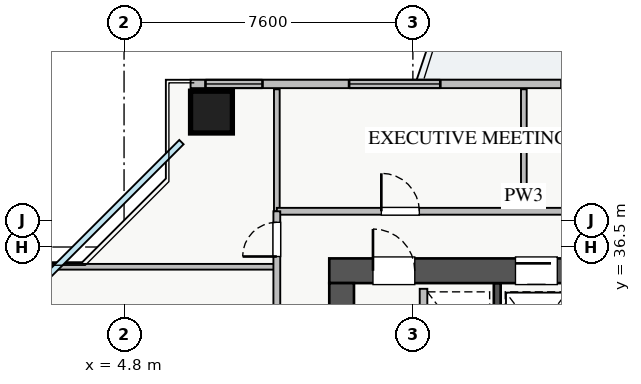
"""IFC4 building model, lengths in metres.
Left out: names, types, materials, properties, quantities, classifications, styles, units other than length and angle.
Written with IfcOpenShell. Run it as: python <this file> out.ifc"""

import sys

from ifc_helpers import new_model, si_unit, direction, frame, frame_2d, origin, origin_2d, place, context, subcontext, project, spatial, rectangle, extrude, source, transform, mapped, element, fill, save


model = new_model("IFC4")
c1 = context("Model", 3, precision=1e-05, world=origin(), true_north=direction((0.0, 1.0)))
c2 = subcontext(c1, "Body", "Model", "MODEL_VIEW")
j1 = project(units=[si_unit("LENGTHUNIT", "METRE"), si_unit("PLANEANGLEUNIT", "RADIAN")], contexts=[c1])
p1 = place(None, origin())
s1 = spatial("IfcSite", under=j1, at=p1, CompositionType="ELEMENT")
p2 = place(p1, origin())
s2 = spatial("IfcBuilding", under=s1, at=p2, CompositionType="ELEMENT")
p3 = place(p2, frame((0.0, 0.0, 100.25)))
s3 = spatial("IfcBuildingStorey", under=s2, at=p3, CompositionType="ELEMENT", Elevation=100.25)
p4 = place(p3, frame((14.62, 33.2, 0.0), z_axis=(0.0, 0.0, 1.0), x_axis=(0.0, 1.0, 0.0)))
e1 = element("IfcWall", 1, at=p4, inside=s3, PredefinedType="SHEAR", context=c2, shape_type="SweptSolid", body=[
    extrude(rectangle(XDim=2.35, YDim=0.18, at=frame_2d((1.175, 0.0))), origin(), (0.0, 0.0, 1.0), 3.07),
])
p5 = place(p3, frame((10.2, 35.875, 0.0), z_axis=(0.0, 0.0, 1.0), x_axis=(1.0, 0.0, 0.0)))
e2 = element("IfcWall", 2, at=p5, inside=s3, PredefinedType="SHEAR", context=c2, shape_type="SweptSolid", body=[
    extrude(rectangle(XDim=17.6, YDim=0.65, at=frame_2d((8.8, 0.0))), origin(), (0.0, 0.0, 1.0), 3.25),
])
p6 = place(p5, frame((1.15, 0.0, 0.0)))
e3 = element("IfcOpeningElement", 3, at=p6, cuts=e2, PredefinedType="OPENING", context=c2, shape_type="SweptSolid", body=[
    extrude(rectangle(XDim=1.1, YDim=2.05, at=frame_2d((0.55, 1.025))), frame((0.0, 0.335, 0.0), z_axis=(0.0, -1.0, 0.0), x_axis=(1.0, 0.0, 0.0)), (0.0, 0.0, 1.0), 0.67),
])
p7 = place(p5, frame((8.3, 0.0, 0.0)))
e4 = element("IfcOpeningElement", 4, at=p7, cuts=e2, PredefinedType="OPENING", context=c2, shape_type="SweptSolid", body=[
    extrude(rectangle(XDim=1.1, YDim=2.05, at=frame_2d((0.55, 1.025))), frame((0.0, 0.335, 0.0), z_axis=(0.0, -1.0, 0.0), x_axis=(1.0, 0.0, 0.0)), (0.0, 0.0, 1.0), 0.67),
])
p8 = place(p5, frame((4.9, 0.0, 0.0)))
e5 = element("IfcOpeningElement", 5, at=p8, cuts=e2, PredefinedType="OPENING", context=c2, shape_type="SweptSolid", body=[
    extrude(rectangle(XDim=1.1, YDim=2.05, at=frame_2d((0.55, 1.025))), frame((0.0, 0.335, 0.0), z_axis=(0.0, -1.0, 0.0), x_axis=(1.0, 0.0, 0.0)), (0.0, 0.0, 1.0), 0.67),
])
p9 = place(p5, frame((14.74, 0.0, 0.0)))
e6 = element("IfcOpeningElement", 6, at=p9, cuts=e2, PredefinedType="OPENING", context=c2, shape_type="SweptSolid", body=[
    extrude(rectangle(XDim=1.0, YDim=2.05, at=frame_2d((0.5, 1.025))), frame((0.0, 0.335, 0.0), z_axis=(0.0, -1.0, 0.0), x_axis=(1.0, 0.0, 0.0)), (0.0, 0.0, 1.0), 0.67),
])
p10 = place(p5, frame((10.25, 0.0, 0.0)))
e7 = element("IfcOpeningElement", 7, at=p10, cuts=e2, PredefinedType="OPENING", context=c2, shape_type="SweptSolid", body=[
    extrude(rectangle(XDim=1.0, YDim=2.05, at=frame_2d((0.5, 1.025))), frame((0.0, 0.335, 0.0), z_axis=(0.0, -1.0, 0.0), x_axis=(1.0, 0.0, 0.0)), (0.0, 0.0, 1.0), 0.67),
])
p11 = place(p5, frame((12.7, 0.0, 0.0)))
e8 = element("IfcOpeningElement", 8, at=p11, cuts=e2, PredefinedType="OPENING", context=c2, shape_type="SweptSolid", body=[
    extrude(rectangle(XDim=1.0, YDim=2.05, at=frame_2d((0.5, 1.025))), frame((0.0, 0.335, 0.0), z_axis=(0.0, -1.0, 0.0), x_axis=(1.0, 0.0, 0.0)), (0.0, 0.0, 1.0), 0.67),
])
p12 = place(p3, frame((10.525, 29.65, 0.0), z_axis=(0.0, 0.0, 1.0), x_axis=(0.0, 1.0, 0.0)))
e9 = element("IfcWall", 9, at=p12, inside=s3, PredefinedType="SHEAR", context=c2, shape_type="SweptSolid", body=[
    extrude(rectangle(XDim=5.9, YDim=0.65, at=frame_2d((2.95, 0.0))), origin(), (0.0, 0.0, 1.0), 3.25),
])
m1 = source(origin(), c2, "Body", "SweptSolid", [
    extrude(rectangle(XDim=1.1, YDim=1.1, at=origin_2d()), origin(), (0.0, 0.0, 1.0), 3.25),
])
p13 = place(p3, frame((7.1, 40.05, 0.0), z_axis=(0.0, 0.0, 1.0), x_axis=(1.0, 0.0, 0.0)))
e10 = element("IfcColumn", 10, at=p13, inside=s3, PredefinedType="COLUMN", context=c2, shape_type="MappedRepresentation", body=[
    mapped(m1, transform((0.0, 0.0, 0.0), x_axis=(1.0, 0.0, 0.0), y_axis=(0.0, 1.0, 0.0), z_axis=(0.0, 0.0, 1.0), scale=1.0)),
])
p14 = place(p3, frame((6.55, 40.79, 0.0), z_axis=(0.0, 0.0, 1.0), x_axis=(1.0, 0.0, 0.0)))
e11 = element("IfcWall", 11, at=p14, inside=s3, PredefinedType="STANDARD", context=c2, shape_type="SweptSolid", body=[
    extrude(rectangle(XDim=24.9, YDim=0.22, at=frame_2d((12.45, 0.0))), origin(), (0.0, 0.0, 1.0), 2.61),
])
p15 = place(p14, frame((13.3, 0.0, 0.0)))
e12 = element("IfcOpeningElement", 12, at=p15, cuts=e11, PredefinedType="OPENING", context=c2, shape_type="SweptSolid", body=[
    extrude(rectangle(XDim=1.2, YDim=2.1, at=frame_2d((0.6, 1.05))), frame((0.0, 0.12, 0.0), z_axis=(0.0, -1.0, 0.0), x_axis=(1.0, 0.0, 0.0)), (0.0, 0.0, 1.0), 0.24),
])
p16 = place(p14, frame((0.393, 0.0, 0.9)))
e13 = element("IfcOpeningElement", 13, at=p16, cuts=e11, PredefinedType="OPENING", context=c2, shape_type="SweptSolid", body=[
    extrude(rectangle(XDim=1.5, YDim=1.5, at=frame_2d((0.75, 0.75))), frame((0.0, 0.12, 0.0), z_axis=(0.0, -1.0, 0.0), x_axis=(1.0, 0.0, 0.0)), (0.0, 0.0, 1.0), 0.24),
])
p17 = place(p14, frame((9.76, 0.0, 0.9)))
e14 = element("IfcOpeningElement", 14, at=p17, cuts=e11, PredefinedType="OPENING", context=c2, shape_type="SweptSolid", body=[
    extrude(rectangle(XDim=1.8, YDim=1.5, at=frame_2d((0.9, 0.75))), frame((0.0, 0.12, 0.0), z_axis=(0.0, -1.0, 0.0), x_axis=(1.0, 0.0, 0.0)), (0.0, 0.0, 1.0), 0.24),
])
p18 = place(p14, frame((14.813, 0.0, 0.9)))
e15 = element("IfcOpeningElement", 15, at=p18, cuts=e11, PredefinedType="OPENING", context=c2, shape_type="SweptSolid", body=[
    extrude(rectangle(XDim=1.5, YDim=1.45, at=frame_2d((0.75, 0.725))), frame((0.0, 0.12, 0.0), z_axis=(0.0, -1.0, 0.0), x_axis=(1.0, 0.0, 0.0)), (0.0, 0.0, 1.0), 0.24),
])
p19 = place(p14, frame((20.738, 0.0, 0.9)))
e16 = element("IfcOpeningElement", 16, at=p19, cuts=e11, PredefinedType="OPENING", context=c2, shape_type="SweptSolid", body=[
    extrude(rectangle(XDim=2.1, YDim=1.48, at=frame_2d((1.05, 0.74))), frame((0.0, 0.12, 0.0), z_axis=(0.0, -1.0, 0.0), x_axis=(1.0, 0.0, 0.0)), (0.0, 0.0, 1.0), 0.24),
])
p20 = place(p14, frame((4.171, 0.0, 0.9)))
e17 = element("IfcOpeningElement", 17, at=p20, cuts=e11, PredefinedType="OPENING", context=c2, shape_type="SweptSolid", body=[
    extrude(rectangle(XDim=2.4, YDim=1.5, at=frame_2d((1.2, 0.75))), frame((0.0, 0.12, 0.0), z_axis=(0.0, -1.0, 0.0), x_axis=(1.0, 0.0, 0.0)), (0.0, 0.0, 1.0), 0.24),
])
p21 = place(p3, frame((12.68, 33.19, 0.0), z_axis=(0.0, 0.0, 1.0), x_axis=(0.0, 1.0, 0.0)))
e18 = element("IfcWall", 18, at=p21, inside=s3, PredefinedType="PARTITIONING", context=c2, shape_type="SweptSolid", body=[
    extrude(rectangle(XDim=2.21, YDim=0.2, at=frame_2d((1.105, 0.0))), origin(), (0.0, 0.0, 1.0), 3.07),
])
for number, where, z_axis, x_axis in (
    (19, (15.32, 37.44, 0.0), (0.0, 0.0, 1.0), (0.0, 1.0, 0.0)),
    (20, (8.82, 37.44, 0.0), (0.0, 0.0, 1.0), (0.0, 1.0, 0.0)),
):
    element("IfcWall", number, at=place(p3, frame(where, z_axis=z_axis, x_axis=x_axis)), inside=s3, PredefinedType="PARTITIONING", context=c2, shape_type="SweptSolid", body=[
        extrude(rectangle(XDim=3.21, YDim=0.15, at=frame_2d((1.605, 0.0))), origin(), (0.0, 0.0, 1.0), 3.07),
    ])
p22 = place(p3, frame((8.82, 37.44, 0.0), z_axis=(0.0, 0.0, 1.0), x_axis=(1.0, 0.0, 0.0)))
e21 = element("IfcWall", 21, at=p22, inside=s3, PredefinedType="PARTITIONING", context=c2, shape_type="SweptSolid", body=[
    extrude(rectangle(XDim=23.58, YDim=0.18, at=frame_2d((11.79, 0.0))), origin(), (0.0, 0.0, 1.0), 3.07),
])
p23 = place(p22, frame((2.75, 0.0, 0.0)))
e22 = element("IfcOpeningElement", 22, at=p23, cuts=e21, PredefinedType="OPENING", context=c2, shape_type="SweptSolid", body=[
    extrude(rectangle(XDim=1.0, YDim=2.05, at=frame_2d((0.5, 1.025))), frame((0.0, 0.1, 0.0), z_axis=(0.0, -1.0, 0.0), x_axis=(1.0, 0.0, 0.0)), (0.0, 0.0, 1.0), 0.2),
])
p24 = place(p22, frame((7.89, 0.0, 0.0)))
e23 = element("IfcOpeningElement", 23, at=p24, cuts=e21, PredefinedType="OPENING", context=c2, shape_type="SweptSolid", body=[
    extrude(rectangle(XDim=1.0, YDim=2.05, at=frame_2d((0.5, 1.025))), frame((0.0, 0.1, 0.0), z_axis=(0.0, -1.0, 0.0), x_axis=(1.0, 0.0, 0.0)), (0.0, 0.0, 1.0), 0.2),
])
p25 = place(p22, frame((13.325, 0.0, 0.0)))
e24 = element("IfcOpeningElement", 24, at=p25, cuts=e21, PredefinedType="OPENING", context=c2, shape_type="SweptSolid", body=[
    extrude(rectangle(XDim=1.0, YDim=2.05, at=frame_2d((0.5, 1.025))), frame((0.0, 0.1, 0.0), z_axis=(0.0, -1.0, 0.0), x_axis=(1.0, 0.0, 0.0)), (0.0, 0.0, 1.0), 0.2),
])
p26 = place(p22, frame((19.765, 0.0, 0.0)))
e25 = element("IfcOpeningElement", 25, at=p26, cuts=e21, PredefinedType="OPENING", context=c2, shape_type="SweptSolid", body=[
    extrude(rectangle(XDim=1.0, YDim=2.05, at=frame_2d((0.5, 1.025))), frame((0.0, 0.1, 0.0), z_axis=(0.0, -1.0, 0.0), x_axis=(1.0, 0.0, 0.0)), (0.0, 0.0, 1.0), 0.2),
])
p27 = place(p3, frame((1.35, 35.98, 0.0), z_axis=(0.0, 0.0, 1.0), x_axis=(1.0, 0.0, 0.0)))
e26 = element("IfcWall", 26, at=p27, inside=s3, PredefinedType="PARTITIONING", context=c2, shape_type="SweptSolid", body=[
    extrude(rectangle(XDim=7.47, YDim=0.15, at=frame_2d((3.735, 0.0))), origin(), (0.0, 0.0, 1.0), 3.07),
])
p28 = place(p3, frame((8.82, 8.31, 0.0), z_axis=(0.0, 0.0, 1.0), x_axis=(0.0, 1.0, 0.0)))
e27 = element("IfcWall", 27, at=p28, inside=s3, PredefinedType="PARTITIONING", context=c2, shape_type="SweptSolid", body=[
    extrude(rectangle(XDim=29.13, YDim=0.18, at=frame_2d((14.565, 0.0))), origin(), (0.0, 0.0, 1.0), 3.07),
])
p29 = place(p28, frame((27.94, 0.0, 0.0)))
e28 = element("IfcOpeningElement", 28, at=p29, cuts=e27, PredefinedType="OPENING", context=c2, shape_type="SweptSolid", body=[
    extrude(rectangle(XDim=0.9, YDim=2.05, at=frame_2d((0.45, 1.025))), frame((0.0, 0.1, 0.0), z_axis=(0.0, -1.0, 0.0), x_axis=(1.0, 0.0, 0.0)), (0.0, 0.0, 1.0), 0.2),
])
p30 = place(p28, frame((0.24, 0.0, 0.0)))
e29 = element("IfcOpeningElement", 29, at=p30, cuts=e27, PredefinedType="OPENING", context=c2, shape_type="SweptSolid", body=[
    extrude(rectangle(XDim=0.9, YDim=2.05, at=frame_2d((0.45, 1.025))), frame((0.0, 0.1, 0.0), z_axis=(0.0, -1.0, 0.0), x_axis=(1.0, 0.0, 0.0)), (0.0, 0.0, 1.0), 0.2),
])
p31 = place(p28, frame((3.69, 0.0, 0.0)))
e30 = element("IfcOpeningElement", 30, at=p31, cuts=e27, PredefinedType="OPENING", context=c2, shape_type="SweptSolid", body=[
    extrude(rectangle(XDim=1.0, YDim=2.05, at=frame_2d((0.5, 1.025))), frame((0.0, 0.1, 0.0), z_axis=(0.0, -1.0, 0.0), x_axis=(1.0, 0.0, 0.0)), (0.0, 0.0, 1.0), 0.2),
])
p32 = place(p28, frame((20.305, 0.0, 0.0)))
e31 = element("IfcOpeningElement", 31, at=p32, cuts=e27, PredefinedType="OPENING", context=c2, shape_type="SweptSolid", body=[
    extrude(rectangle(XDim=1.0, YDim=2.05, at=frame_2d((0.5, 1.025))), frame((0.0, 0.1, 0.0), z_axis=(0.0, -1.0, 0.0), x_axis=(1.0, 0.0, 0.0)), (0.0, 0.0, 1.0), 0.2),
])
m2 = source(origin(), c2, "Body", "SweptSolid", [
    extrude(rectangle(XDim=1.5, YDim=1.5, at=frame_2d((0.75, 0.75))), frame((0.0, 0.03, 0.0), z_axis=(0.0, -1.0, 0.0), x_axis=(1.0, 0.0, 0.0)), (0.0, 0.0, 1.0), 0.06),
])
p33 = place(p16, origin())
e32 = element("IfcWindow", 32, at=p33, inside=s3, PartitioningType="TRIPLE_PANEL_VERTICAL", PredefinedType="WINDOW", context=c2, shape_type="MappedRepresentation", body=[
    mapped(m2, transform((0.0, 0.0, 0.0), x_axis=(1.0, 0.0, 0.0), y_axis=(0.0, 1.0, 0.0), z_axis=(0.0, 0.0, 1.0), scale=1.0)),
])
fill(e13, e32)
m3 = source(origin(), c2, "Body", "SweptSolid", [
    extrude(rectangle(XDim=1.1, YDim=2.05, at=frame_2d((0.55, 1.025))), frame((0.0, 0.025, 0.0), z_axis=(0.0, -1.0, 0.0), x_axis=(1.0, 0.0, 0.0)), (0.0, 0.0, 1.0), 0.05),
])
p34 = place(p6, origin())
e33 = element("IfcDoor", 33, at=p34, inside=s3, OperationType="SINGLE_SWING_LEFT", PredefinedType="DOOR", context=c2, shape_type="MappedRepresentation", body=[
    mapped(m3, transform((0.0, 0.0, 0.0), x_axis=(1.0, 0.0, 0.0), y_axis=(0.0, 1.0, 0.0), z_axis=(0.0, 0.0, 1.0), scale=1.0)),
])
fill(e3, e33)
p35 = place(p8, origin())
e34 = element("IfcDoor", 34, at=p35, inside=s3, OperationType="SLIDING_TO_LEFT", PredefinedType="DOOR", context=c2, shape_type="MappedRepresentation", body=[
    mapped(m3, transform((0.0, 0.0, 0.0), x_axis=(1.0, 0.0, 0.0), y_axis=(0.0, 1.0, 0.0), z_axis=(0.0, 0.0, 1.0), scale=1.0)),
])
fill(e5, e34)
m4 = source(origin(), c2, "Body", "SweptSolid", [
    extrude(rectangle(XDim=1.0, YDim=2.05, at=frame_2d((0.5, 1.025))), frame((0.0, 0.025, 0.0), z_axis=(0.0, -1.0, 0.0), x_axis=(1.0, 0.0, 0.0)), (0.0, 0.0, 1.0), 0.05),
])
p36 = place(p23, origin())
e35 = element("IfcDoor", 35, at=p36, inside=s3, OperationType="SINGLE_SWING_LEFT", PredefinedType="DOOR", context=c2, shape_type="MappedRepresentation", body=[
    mapped(m4, transform((0.0, 0.0, 0.0), x_axis=(1.0, 0.0, 0.0), y_axis=(0.0, 1.0, 0.0), z_axis=(0.0, 0.0, 1.0), scale=1.0)),
])
fill(e22, e35)
m5 = source(origin(), c2, "Body", "SweptSolid", [
    extrude(rectangle(XDim=0.9, YDim=2.05, at=frame_2d((0.45, 1.025))), frame((0.0, 0.025, 0.0), z_axis=(0.0, -1.0, 0.0), x_axis=(1.0, 0.0, 0.0)), (0.0, 0.0, 1.0), 0.05),
])
p37 = place(p29, origin())
e36 = element("IfcDoor", 36, at=p37, inside=s3, OperationType="SINGLE_SWING_LEFT", PredefinedType="DOOR", context=c2, shape_type="MappedRepresentation", body=[
    mapped(m5, transform((0.0, 0.0, 0.0), x_axis=(1.0, 0.0, 0.0), y_axis=(0.0, 1.0, 0.0), z_axis=(0.0, 0.0, 1.0), scale=1.0)),
])
fill(e28, e36)
m6 = source(origin(), c2, "Body", "SweptSolid", [
    extrude(rectangle(XDim=2.4, YDim=1.5, at=frame_2d((1.2, 0.75))), frame((0.0, 0.03, 0.0), z_axis=(0.0, -1.0, 0.0), x_axis=(1.0, 0.0, 0.0)), (0.0, 0.0, 1.0), 0.06),
])
p38 = place(p20, origin())
e37 = element("IfcWindow", 37, at=p38, inside=s3, PartitioningType="TRIPLE_PANEL_VERTICAL", PredefinedType="WINDOW", context=c2, shape_type="MappedRepresentation", body=[
    mapped(m6, transform((0.0, 0.0, 0.0), x_axis=(1.0, 0.0, 0.0), y_axis=(0.0, 1.0, 0.0), z_axis=(0.0, 0.0, 1.0), scale=1.0)),
])
fill(e17, e37)
save(model, sys.argv[1])
